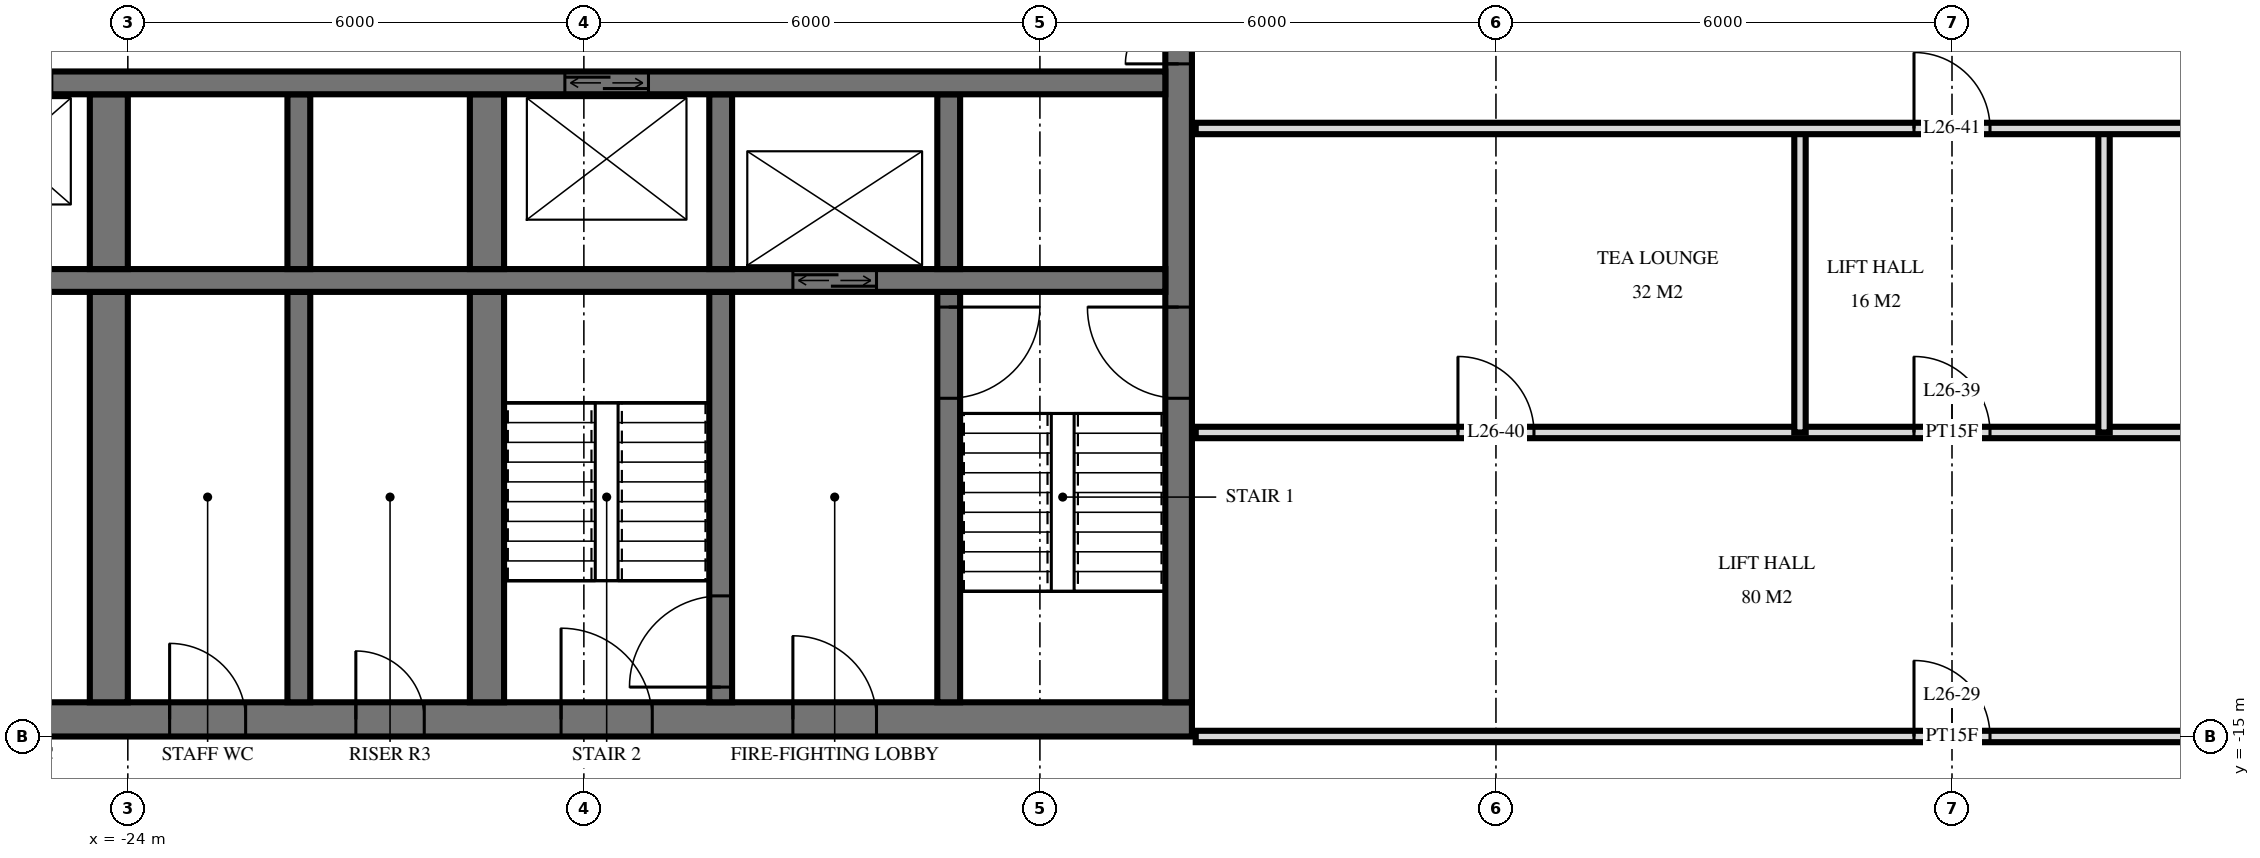
"""IFC4 building model, lengths in metres.
Left out: names, types, materials, properties, quantities, classifications, styles, units other than length and angle.
Written with IfcOpenShell. Run it as: python <this file> out.ifc"""

import sys

from ifc_helpers import new_model, si_unit, direction, frame, frame_2d, origin, place, context, subcontext, project, spatial, rectangle, extrude, element, fill, save


model = new_model("IFC4")
c1 = context("Model", 3, precision=1e-05, world=origin(), true_north=direction((0.0, 1.0)))
c2 = subcontext(c1, "Body", "Model", "MODEL_VIEW")
j1 = project(units=[si_unit("LENGTHUNIT", "METRE"), si_unit("PLANEANGLEUNIT", "RADIAN")], contexts=[c1])
p1 = place(None, origin())
s1 = spatial("IfcSite", under=j1, at=p1, CompositionType="ELEMENT")
p2 = place(p1, origin())
s2 = spatial("IfcBuilding", under=s1, at=p2, CompositionType="ELEMENT")
p3 = place(p2, frame((0.0, 0.0, 103.2)))
s3 = spatial("IfcBuildingStorey", under=s2, at=p3, CompositionType="ELEMENT", Elevation=103.2)
p4 = place(p3, frame((-29.5, -14.775, 0.0), z_axis=(0.0, 0.0, 1.0), x_axis=(1.0, 0.0, 0.0)))
e1 = element("IfcWall", 1, at=p4, inside=s3, PredefinedType="SHEAR", context=c2, shape_type="SweptSolid", body=[
    extrude(rectangle(XDim=19.5, YDim=0.45, at=frame_2d((9.75, 0.0))), origin(), (0.0, 0.0, 1.0), 3.6),
])
p5 = place(p4, frame((11.2, 0.0, 0.0)))
e2 = element("IfcOpeningElement", 2, at=p5, cuts=e1, PredefinedType="OPENING", context=c2, shape_type="SweptSolid", body=[
    extrude(rectangle(XDim=1.2, YDim=2.1, at=frame_2d((0.6, 1.05))), frame((0.0, 0.235, 0.0), z_axis=(0.0, -1.0, 0.0), x_axis=(1.0, 0.0, 0.0)), (0.0, 0.0, 1.0), 0.47),
])
p6 = place(p4, frame((14.25, 0.0, 0.0)))
e3 = element("IfcOpeningElement", 3, at=p6, cuts=e1, PredefinedType="OPENING", context=c2, shape_type="SweptSolid", body=[
    extrude(rectangle(XDim=1.1, YDim=2.1, at=frame_2d((0.55, 1.05))), frame((0.0, 0.235, 0.0), z_axis=(0.0, -1.0, 0.0), x_axis=(1.0, 0.0, 0.0)), (0.0, 0.0, 1.0), 0.47),
])
p7 = place(p4, frame((8.5, 0.0, 0.0)))
e4 = element("IfcOpeningElement", 4, at=p7, cuts=e1, PredefinedType="OPENING", context=c2, shape_type="SweptSolid", body=[
    extrude(rectangle(XDim=0.9, YDim=2.1, at=frame_2d((0.45, 1.05))), frame((0.0, 0.235, 0.0), z_axis=(0.0, -1.0, 0.0), x_axis=(1.0, 0.0, 0.0)), (0.0, 0.0, 1.0), 0.47),
])
p8 = place(p4, frame((6.05, 0.0, 0.0)))
e5 = element("IfcOpeningElement", 5, at=p8, cuts=e1, PredefinedType="OPENING", context=c2, shape_type="SweptSolid", body=[
    extrude(rectangle(XDim=1.0, YDim=2.1, at=frame_2d((0.5, 1.05))), frame((0.0, 0.235, 0.0), z_axis=(0.0, -1.0, 0.0), x_axis=(1.0, 0.0, 0.0)), (0.0, 0.0, 1.0), 0.47),
])
p9 = place(p4, frame((3.413, 0.0, 0.0)))
e6 = element("IfcOpeningElement", 6, at=p9, cuts=e1, PredefinedType="OPENING", context=c2, shape_type="SweptSolid", body=[
    extrude(rectangle(XDim=1.0, YDim=2.1, at=frame_2d((0.5, 1.05))), frame((0.0, 0.235, 0.0), z_axis=(0.0, -1.0, 0.0), x_axis=(1.0, 0.0, 0.0)), (0.0, 0.0, 1.0), 0.47),
])
p10 = place(p4, frame((1.087, 0.0, 0.0)))
e7 = element("IfcOpeningElement", 7, at=p10, cuts=e1, PredefinedType="OPENING", context=c2, shape_type="SweptSolid", body=[
    extrude(rectangle(XDim=1.0, YDim=2.1, at=frame_2d((0.5, 1.05))), frame((0.0, 0.235, 0.0), z_axis=(0.0, -1.0, 0.0), x_axis=(1.0, 0.0, 0.0)), (0.0, 0.0, 1.0), 0.47),
])
p11 = place(p3, frame((-10.175, -14.55, 0.0), z_axis=(0.0, 0.0, 1.0), x_axis=(0.0, 1.0, 0.0)))
e8 = element("IfcWall", 8, at=p11, inside=s3, PredefinedType="SHEAR", context=c2, shape_type="SweptSolid", body=[
    extrude(rectangle(XDim=14.1, YDim=0.35, at=frame_2d((7.05, 0.0))), origin(), (0.0, 0.0, 1.0), 3.6),
])
p12 = place(p11, frame((8.4, 0.0, 0.0)))
e9 = element("IfcOpeningElement", 9, at=p12, cuts=e8, PredefinedType="OPENING", context=c2, shape_type="SweptSolid", body=[
    extrude(rectangle(XDim=1.4, YDim=2.4, at=frame_2d((0.7, 1.2))), frame((0.0, 0.185, 0.0), z_axis=(0.0, -1.0, 0.0), x_axis=(1.0, 0.0, 0.0)), (0.0, 0.0, 1.0), 0.37),
])
p13 = place(p11, frame((10.0, 0.0, 0.0)))
e10 = element("IfcOpeningElement", 10, at=p13, cuts=e8, PredefinedType="OPENING", context=c2, shape_type="SweptSolid", body=[
    extrude(rectangle(XDim=1.4, YDim=2.4, at=frame_2d((0.7, 1.2))), frame((0.0, 0.185, 0.0), z_axis=(0.0, -1.0, 0.0), x_axis=(1.0, 0.0, 0.0)), (0.0, 0.0, 1.0), 0.37),
])
p14 = place(p11, frame((4.0, 0.0, 0.0)))
e11 = element("IfcOpeningElement", 11, at=p14, cuts=e8, PredefinedType="OPENING", context=c2, shape_type="SweptSolid", body=[
    extrude(rectangle(XDim=1.2, YDim=2.1, at=frame_2d((0.6, 1.05))), frame((0.0, 0.185, 0.0), z_axis=(0.0, -1.0, 0.0), x_axis=(1.0, 0.0, 0.0)), (0.0, 0.0, 1.0), 0.37),
])
p15 = place(p3, frame((-29.05, -6.4, 0.0), z_axis=(0.0, 0.0, 1.0), x_axis=(1.0, 0.0, 0.0)))
e12 = element("IfcWall", 12, at=p15, inside=s3, PredefinedType="SHEAR", context=c2, shape_type="SweptSolid", body=[
    extrude(rectangle(XDim=18.7, YDim=0.3, at=frame_2d((9.35, 0.0))), origin(), (0.0, 0.0, 1.0), 3.6),
])
p16 = place(p15, frame((2.95, 0.0, 0.0)))
e13 = element("IfcOpeningElement", 13, at=p16, cuts=e12, PredefinedType="OPENING", context=c2, shape_type="SweptSolid", body=[
    extrude(rectangle(XDim=1.1, YDim=2.1, at=frame_2d((0.55, 1.05))), frame((0.0, 0.16, 0.0), z_axis=(0.0, -1.0, 0.0), x_axis=(1.0, 0.0, 0.0)), (0.0, 0.0, 1.0), 0.32),
])
p17 = place(p15, frame((0.55, 0.0, 0.0)))
e14 = element("IfcOpeningElement", 14, at=p17, cuts=e12, PredefinedType="OPENING", context=c2, shape_type="SweptSolid", body=[
    extrude(rectangle(XDim=1.1, YDim=2.1, at=frame_2d((0.55, 1.05))), frame((0.0, 0.16, 0.0), z_axis=(0.0, -1.0, 0.0), x_axis=(1.0, 0.0, 0.0)), (0.0, 0.0, 1.0), 0.32),
])
p18 = place(p15, frame((10.8, 0.0, 0.0)))
e15 = element("IfcOpeningElement", 15, at=p18, cuts=e12, PredefinedType="OPENING", context=c2, shape_type="SweptSolid", body=[
    extrude(rectangle(XDim=1.1, YDim=2.1, at=frame_2d((0.55, 1.05))), frame((0.0, 0.16, 0.0), z_axis=(0.0, -1.0, 0.0), x_axis=(1.0, 0.0, 0.0)), (0.0, 0.0, 1.0), 0.32),
])
p19 = place(p3, frame((-29.05, -9.0, 0.0), z_axis=(0.0, 0.0, 1.0), x_axis=(1.0, 0.0, 0.0)))
e16 = element("IfcWall", 16, at=p19, inside=s3, PredefinedType="SHEAR", context=c2, shape_type="SweptSolid", body=[
    extrude(rectangle(XDim=18.7, YDim=0.3, at=frame_2d((9.35, 0.0))), origin(), (0.0, 0.0, 1.0), 3.6),
])
p20 = place(p19, frame((13.8, 0.0, 0.0)))
e17 = element("IfcOpeningElement", 17, at=p20, cuts=e16, PredefinedType="OPENING", context=c2, shape_type="SweptSolid", body=[
    extrude(rectangle(XDim=1.1, YDim=2.1, at=frame_2d((0.55, 1.05))), frame((0.0, 0.16, 0.0), z_axis=(0.0, -1.0, 0.0), x_axis=(1.0, 0.0, 0.0)), (0.0, 0.0, 1.0), 0.32),
])
p21 = place(p3, frame((-13.2, -8.85, 0.0), z_axis=(0.0, 0.0, 1.0), x_axis=(0.0, 1.0, 0.0)))
e18 = element("IfcWall", 18, at=p21, inside=s3, PredefinedType="SHEAR", context=c2, shape_type="SweptSolid", body=[
    extrude(rectangle(XDim=2.3, YDim=0.3, at=frame_2d((1.15, 0.0))), origin(), (0.0, 0.0, 1.0), 3.6),
])
p22 = place(p3, frame((-13.2, -14.55, 0.0), z_axis=(0.0, 0.0, 1.0), x_axis=(0.0, 1.0, 0.0)))
e19 = element("IfcWall", 19, at=p22, inside=s3, PredefinedType="SHEAR", context=c2, shape_type="SweptSolid", body=[
    extrude(rectangle(XDim=5.4, YDim=0.3, at=frame_2d((2.7, 0.0))), origin(), (0.0, 0.0, 1.0), 3.6),
])
p23 = place(p22, frame((4.0, 0.0, 0.0)))
e20 = element("IfcOpeningElement", 20, at=p23, cuts=e19, PredefinedType="OPENING", context=c2, shape_type="SweptSolid", body=[
    extrude(rectangle(XDim=1.2, YDim=2.1, at=frame_2d((0.6, 1.05))), frame((0.0, 0.16, 0.0), z_axis=(0.0, -1.0, 0.0), x_axis=(1.0, 0.0, 0.0)), (0.0, 0.0, 1.0), 0.32),
])
p24 = place(p3, frame((-16.2, -8.85, 0.0), z_axis=(0.0, 0.0, 1.0), x_axis=(0.0, 1.0, 0.0)))
e21 = element("IfcWall", 21, at=p24, inside=s3, PredefinedType="SHEAR", context=c2, shape_type="SweptSolid", body=[
    extrude(rectangle(XDim=2.3, YDim=0.3, at=frame_2d((1.15, 0.0))), origin(), (0.0, 0.0, 1.0), 3.6),
])
p25 = place(p3, frame((-16.2, -14.55, 0.0), z_axis=(0.0, 0.0, 1.0), x_axis=(0.0, 1.0, 0.0)))
e22 = element("IfcWall", 22, at=p25, inside=s3, PredefinedType="SHEAR", context=c2, shape_type="SweptSolid", body=[
    extrude(rectangle(XDim=5.4, YDim=0.3, at=frame_2d((2.7, 0.0))), origin(), (0.0, 0.0, 1.0), 3.6),
])
p26 = place(p25, frame((0.2, 0.0, 0.0)))
e23 = element("IfcOpeningElement", 23, at=p26, cuts=e22, PredefinedType="OPENING", context=c2, shape_type="SweptSolid", body=[
    extrude(rectangle(XDim=1.2, YDim=2.1, at=frame_2d((0.6, 1.05))), frame((0.0, 0.16, 0.0), z_axis=(0.0, -1.0, 0.0), x_axis=(1.0, 0.0, 0.0)), (0.0, 0.0, 1.0), 0.32),
])
p27 = place(p3, frame((-19.275, -8.85, 0.0), z_axis=(0.0, 0.0, 1.0), x_axis=(0.0, 1.0, 0.0)))
e24 = element("IfcWall", 24, at=p27, inside=s3, PredefinedType="SHEAR", context=c2, shape_type="SweptSolid", body=[
    extrude(rectangle(XDim=2.3, YDim=0.45, at=frame_2d((1.15, 0.0))), origin(), (0.0, 0.0, 1.0), 3.6),
])
p28 = place(p3, frame((-19.275, -14.55, 0.0), z_axis=(0.0, 0.0, 1.0), x_axis=(0.0, 1.0, 0.0)))
e25 = element("IfcWall", 25, at=p28, inside=s3, PredefinedType="SHEAR", context=c2, shape_type="SweptSolid", body=[
    extrude(rectangle(XDim=5.4, YDim=0.45, at=frame_2d((2.7, 0.0))), origin(), (0.0, 0.0, 1.0), 3.6),
])
p29 = place(p3, frame((-21.75, -8.85, 0.0), z_axis=(0.0, 0.0, 1.0), x_axis=(0.0, 1.0, 0.0)))
e26 = element("IfcWall", 26, at=p29, inside=s3, PredefinedType="SHEAR", context=c2, shape_type="SweptSolid", body=[
    extrude(rectangle(XDim=2.3, YDim=0.3, at=frame_2d((1.15, 0.0))), origin(), (0.0, 0.0, 1.0), 3.6),
])
p30 = place(p3, frame((-21.75, -14.55, 0.0), z_axis=(0.0, 0.0, 1.0), x_axis=(0.0, 1.0, 0.0)))
e27 = element("IfcWall", 27, at=p30, inside=s3, PredefinedType="SHEAR", context=c2, shape_type="SweptSolid", body=[
    extrude(rectangle(XDim=5.4, YDim=0.3, at=frame_2d((2.7, 0.0))), origin(), (0.0, 0.0, 1.0), 3.6),
])
p31 = place(p3, frame((-24.25, -8.85, 0.0), z_axis=(0.0, 0.0, 1.0), x_axis=(0.0, 1.0, 0.0)))
e28 = element("IfcWall", 28, at=p31, inside=s3, PredefinedType="SHEAR", context=c2, shape_type="SweptSolid", body=[
    extrude(rectangle(XDim=2.3, YDim=0.5, at=frame_2d((1.15, 0.0))), origin(), (0.0, 0.0, 1.0), 3.6),
])
p32 = place(p3, frame((-24.25, -14.55, 0.0), z_axis=(0.0, 0.0, 1.0), x_axis=(0.0, 1.0, 0.0)))
e29 = element("IfcWall", 29, at=p32, inside=s3, PredefinedType="SHEAR", context=c2, shape_type="SweptSolid", body=[
    extrude(rectangle(XDim=5.4, YDim=0.5, at=frame_2d((2.7, 0.0))), origin(), (0.0, 0.0, 1.0), 3.6),
])
for number, where, z_axis, x_axis in (
    (30, (2.0, -11.0, 0.0), (0.0, 0.0, 1.0), (0.0, 1.0, 0.0)),
    (31, (-2.0, -11.0, 0.0), (0.0, 0.0, 1.0), (0.0, 1.0, 0.0)),
):
    element("IfcWall", number, at=place(p3, frame(where, z_axis=z_axis, x_axis=x_axis)), inside=s3, PredefinedType="PARTITIONING", context=c2, shape_type="SweptSolid", body=[
        extrude(rectangle(XDim=4.0, YDim=0.15, at=frame_2d((2.0, 0.0))), origin(), (0.0, 0.0, 1.0), 3.32),
    ])
p33 = place(p3, frame((-9.95, -15.0, 0.0), z_axis=(0.0, 0.0, 1.0), x_axis=(1.0, 0.0, 0.0)))
e32 = element("IfcWall", 32, at=p33, inside=s3, PredefinedType="PARTITIONING", context=c2, shape_type="SweptSolid", body=[
    extrude(rectangle(XDim=19.9, YDim=0.15, at=frame_2d((9.95, 0.0))), origin(), (0.0, 0.0, 1.0), 3.32),
])
p34 = place(p33, frame((9.45, 0.0, 0.0)))
e33 = element("IfcOpeningElement", 33, at=p34, cuts=e32, PredefinedType="OPENING", context=c2, shape_type="SweptSolid", body=[
    extrude(rectangle(XDim=1.0, YDim=2.1, at=frame_2d((0.5, 1.05))), frame((0.0, 0.085, 0.0), z_axis=(0.0, -1.0, 0.0), x_axis=(1.0, 0.0, 0.0)), (0.0, 0.0, 1.0), 0.17),
])
p35 = place(p3, frame((-9.95, -11.0, 0.0), z_axis=(0.0, 0.0, 1.0), x_axis=(1.0, 0.0, 0.0)))
e34 = element("IfcWall", 34, at=p35, inside=s3, PredefinedType="PARTITIONING", context=c2, shape_type="SweptSolid", body=[
    extrude(rectangle(XDim=19.9, YDim=0.15, at=frame_2d((9.95, 0.0))), origin(), (0.0, 0.0, 1.0), 3.32),
])
p36 = place(p35, frame((9.45, 0.0, 0.0)))
e35 = element("IfcOpeningElement", 35, at=p36, cuts=e34, PredefinedType="OPENING", context=c2, shape_type="SweptSolid", body=[
    extrude(rectangle(XDim=1.0, YDim=2.1, at=frame_2d((0.5, 1.05))), frame((0.0, 0.085, 0.0), z_axis=(0.0, -1.0, 0.0), x_axis=(1.0, 0.0, 0.0)), (0.0, 0.0, 1.0), 0.17),
])
p37 = place(p35, frame((3.45, 0.0, 0.0)))
e36 = element("IfcOpeningElement", 36, at=p37, cuts=e34, PredefinedType="OPENING", context=c2, shape_type="SweptSolid", body=[
    extrude(rectangle(XDim=1.0, YDim=2.1, at=frame_2d((0.5, 1.05))), frame((0.0, 0.085, 0.0), z_axis=(0.0, -1.0, 0.0), x_axis=(1.0, 0.0, 0.0)), (0.0, 0.0, 1.0), 0.17),
])
p38 = place(p3, frame((-9.95, -7.0, 0.0), z_axis=(0.0, 0.0, 1.0), x_axis=(1.0, 0.0, 0.0)))
e37 = element("IfcWall", 37, at=p38, inside=s3, PredefinedType="PARTITIONING", context=c2, shape_type="SweptSolid", body=[
    extrude(rectangle(XDim=19.9, YDim=0.15, at=frame_2d((9.95, 0.0))), origin(), (0.0, 0.0, 1.0), 3.32),
])
p39 = place(p38, frame((9.45, 0.0, 0.0)))
e38 = element("IfcOpeningElement", 38, at=p39, cuts=e37, PredefinedType="OPENING", context=c2, shape_type="SweptSolid", body=[
    extrude(rectangle(XDim=1.0, YDim=2.1, at=frame_2d((0.5, 1.05))), frame((0.0, 0.085, 0.0), z_axis=(0.0, -1.0, 0.0), x_axis=(1.0, 0.0, 0.0)), (0.0, 0.0, 1.0), 0.17),
])
p40 = place(p38, frame((15.45, 0.0, 0.0)))
e39 = element("IfcOpeningElement", 39, at=p40, cuts=e37, PredefinedType="OPENING", context=c2, shape_type="SweptSolid", body=[
    extrude(rectangle(XDim=1.0, YDim=2.1, at=frame_2d((0.5, 1.05))), frame((0.0, 0.085, 0.0), z_axis=(0.0, -1.0, 0.0), x_axis=(1.0, 0.0, 0.0)), (0.0, 0.0, 1.0), 0.17),
])
p41 = place(p20, origin())
e40 = element("IfcDoor", 40, at=p41, inside=s3, OperationType="DOUBLE_DOOR_SLIDING", PredefinedType="USERDEFINED", context=c2, shape_type="SweptSolid", body=[
    extrude(rectangle(XDim=1.1, YDim=2.1, at=frame_2d((0.55, 1.05))), frame((0.0, 0.025, 0.0), z_axis=(0.0, -1.0, 0.0), x_axis=(1.0, 0.0, 0.0)), (0.0, 0.0, 1.0), 0.05),
])
fill(e17, e40)
p42 = place(p18, origin())
e41 = element("IfcDoor", 41, at=p42, inside=s3, OperationType="DOUBLE_DOOR_SLIDING", PredefinedType="USERDEFINED", context=c2, shape_type="SweptSolid", body=[
    extrude(rectangle(XDim=1.1, YDim=2.1, at=frame_2d((0.55, 1.05))), frame((0.0, 0.025, 0.0), z_axis=(0.0, -1.0, 0.0), x_axis=(1.0, 0.0, 0.0)), (0.0, 0.0, 1.0), 0.05),
])
fill(e15, e41)
p43 = place(p12, origin())
e42 = element("IfcDoor", 42, at=p43, inside=s3, OperationType="DOUBLE_DOOR_SINGLE_SWING", PredefinedType="DOOR", context=c2, shape_type="SweptSolid", body=[
    extrude(rectangle(XDim=1.4, YDim=2.4, at=frame_2d((0.7, 1.2))), frame((0.0, 0.025, 0.0), z_axis=(0.0, -1.0, 0.0), x_axis=(1.0, 0.0, 0.0)), (0.0, 0.0, 1.0), 0.05),
])
fill(e9, e42)
p44 = place(p14, origin())
e43 = element("IfcDoor", 43, at=p44, inside=s3, OperationType="SINGLE_SWING_LEFT", PredefinedType="DOOR", context=c2, shape_type="SweptSolid", body=[
    extrude(rectangle(XDim=1.2, YDim=2.1, at=frame_2d((0.6, 1.05))), frame((0.0, 0.025, 0.0), z_axis=(0.0, -1.0, 0.0), x_axis=(1.0, 0.0, 0.0)), (0.0, 0.0, 1.0), 0.05),
])
fill(e11, e43)
p45 = place(p5, origin())
e44 = element("IfcDoor", 44, at=p45, inside=s3, OperationType="SINGLE_SWING_RIGHT", PredefinedType="DOOR", context=c2, shape_type="SweptSolid", body=[
    extrude(rectangle(XDim=1.2, YDim=2.1, at=frame_2d((0.6, 1.05))), frame((0.0, 0.025, 0.0), z_axis=(0.0, -1.0, 0.0), x_axis=(1.0, 0.0, 0.0)), (0.0, 0.0, 1.0), 0.05),
])
fill(e2, e44)
p46 = place(p6, origin())
e45 = element("IfcDoor", 45, at=p46, inside=s3, OperationType="SINGLE_SWING_RIGHT", PredefinedType="DOOR", context=c2, shape_type="SweptSolid", body=[
    extrude(rectangle(XDim=1.1, YDim=2.1, at=frame_2d((0.55, 1.05))), frame((0.0, 0.025, 0.0), z_axis=(0.0, -1.0, 0.0), x_axis=(1.0, 0.0, 0.0)), (0.0, 0.0, 1.0), 0.05),
])
fill(e3, e45)
p47 = place(p7, origin())
e46 = element("IfcDoor", 46, at=p47, inside=s3, OperationType="SINGLE_SWING_RIGHT", PredefinedType="DOOR", context=c2, shape_type="SweptSolid", body=[
    extrude(rectangle(XDim=0.9, YDim=2.1, at=frame_2d((0.45, 1.05))), frame((0.0, 0.025, 0.0), z_axis=(0.0, -1.0, 0.0), x_axis=(1.0, 0.0, 0.0)), (0.0, 0.0, 1.0), 0.05),
])
fill(e4, e46)
p48 = place(p8, origin())
e47 = element("IfcDoor", 47, at=p48, inside=s3, OperationType="SINGLE_SWING_RIGHT", PredefinedType="DOOR", context=c2, shape_type="SweptSolid", body=[
    extrude(rectangle(XDim=1.0, YDim=2.1, at=frame_2d((0.5, 1.05))), frame((0.0, 0.025, 0.0), z_axis=(0.0, -1.0, 0.0), x_axis=(1.0, 0.0, 0.0)), (0.0, 0.0, 1.0), 0.05),
])
fill(e5, e47)
p49 = place(p23, frame((0.6, 0.0, 0.0), z_axis=(0.0, 0.0, 1.0), x_axis=(-1.0, 0.0, 0.0)))
e48 = element("IfcDoor", 48, at=p49, inside=s3, OperationType="SINGLE_SWING_RIGHT", PredefinedType="DOOR", context=c2, shape_type="SweptSolid", body=[
    extrude(rectangle(XDim=1.2, YDim=2.1, at=frame_2d((0.0, 1.05))), frame((0.0, -0.025, 0.0), z_axis=(0.0, 1.0, 0.0), x_axis=(-1.0, 0.0, 0.0)), (0.0, 0.0, 1.0), 0.05),
])
fill(e20, e48)
p50 = place(p26, origin())
e49 = element("IfcDoor", 49, at=p50, inside=s3, OperationType="SINGLE_SWING_RIGHT", PredefinedType="DOOR", context=c2, shape_type="SweptSolid", body=[
    extrude(rectangle(XDim=1.2, YDim=2.1, at=frame_2d((0.6, 1.05))), frame((0.0, 0.025, 0.0), z_axis=(0.0, -1.0, 0.0), x_axis=(1.0, 0.0, 0.0)), (0.0, 0.0, 1.0), 0.05),
])
fill(e23, e49)
p51 = place(p34, origin())
e50 = element("IfcDoor", 50, at=p51, inside=s3, OperationType="SINGLE_SWING_RIGHT", PredefinedType="DOOR", context=c2, shape_type="SweptSolid", body=[
    extrude(rectangle(XDim=1.0, YDim=2.1, at=frame_2d((0.5, 1.05))), frame((0.0, 0.025, 0.0), z_axis=(0.0, -1.0, 0.0), x_axis=(1.0, 0.0, 0.0)), (0.0, 0.0, 1.0), 0.05),
])
fill(e33, e50)
p52 = place(p36, origin())
e51 = element("IfcDoor", 51, at=p52, inside=s3, OperationType="SINGLE_SWING_RIGHT", PredefinedType="DOOR", context=c2, shape_type="SweptSolid", body=[
    extrude(rectangle(XDim=1.0, YDim=2.1, at=frame_2d((0.5, 1.05))), frame((0.0, 0.025, 0.0), z_axis=(0.0, -1.0, 0.0), x_axis=(1.0, 0.0, 0.0)), (0.0, 0.0, 1.0), 0.05),
])
fill(e35, e51)
p53 = place(p37, origin())
e52 = element("IfcDoor", 52, at=p53, inside=s3, OperationType="SINGLE_SWING_RIGHT", PredefinedType="DOOR", context=c2, shape_type="SweptSolid", body=[
    extrude(rectangle(XDim=1.0, YDim=2.1, at=frame_2d((0.5, 1.05))), frame((0.0, 0.025, 0.0), z_axis=(0.0, -1.0, 0.0), x_axis=(1.0, 0.0, 0.0)), (0.0, 0.0, 1.0), 0.05),
])
fill(e36, e52)
p54 = place(p39, origin())
e53 = element("IfcDoor", 53, at=p54, inside=s3, OperationType="SINGLE_SWING_RIGHT", PredefinedType="DOOR", context=c2, shape_type="SweptSolid", body=[
    extrude(rectangle(XDim=1.0, YDim=2.1, at=frame_2d((0.5, 1.05))), frame((0.0, 0.025, 0.0), z_axis=(0.0, -1.0, 0.0), x_axis=(1.0, 0.0, 0.0)), (0.0, 0.0, 1.0), 0.05),
])
fill(e38, e53)
save(model, sys.argv[1])
